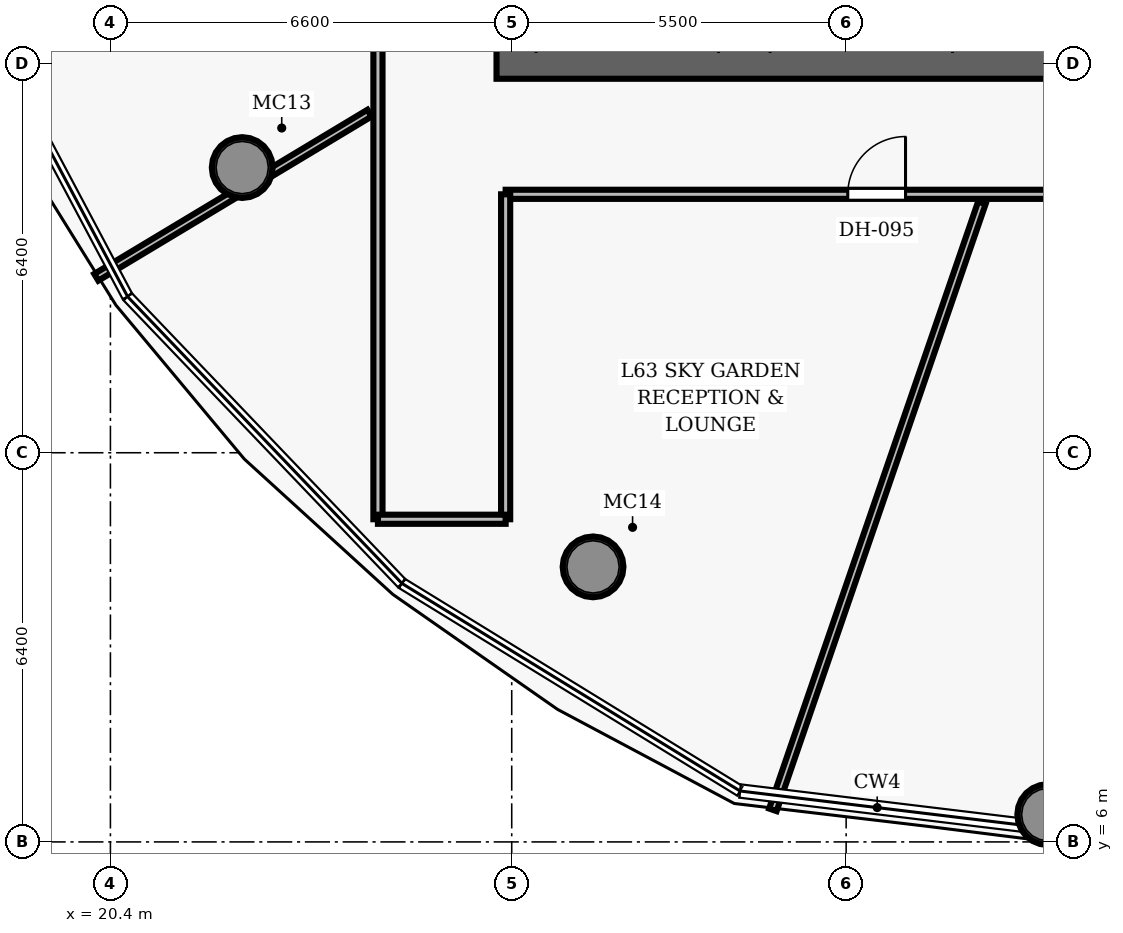
"""IFC4 building model, lengths in metres.
Left out: names, types, materials, properties, quantities, classifications, styles, units other than length and angle.
Written with IfcOpenShell. Run it as: python <this file> out.ifc"""

import sys

from ifc_helpers import new_model, si_unit, direction, frame, frame_2d, origin, origin_2d, place, context, subcontext, project, spatial, rectangle, hollow_circle, extrude, element, fill, save


model = new_model("IFC4")
c1 = context("Model", 3, precision=1e-05, world=origin(), true_north=direction((0.0, 1.0)))
c2 = subcontext(c1, "Body", "Model", "MODEL_VIEW")
j1 = project(units=[si_unit("LENGTHUNIT", "METRE"), si_unit("PLANEANGLEUNIT", "RADIAN")], contexts=[c1])
p1 = place(None, origin())
s1 = spatial("IfcSite", under=j1, at=p1, CompositionType="ELEMENT")
p2 = place(p1, origin())
s2 = spatial("IfcBuilding", under=s1, at=p2, CompositionType="ELEMENT")
p3 = place(p2, frame((0.0, 0.0, 249.75)))
s3 = spatial("IfcBuildingStorey", under=s2, at=p3, CompositionType="ELEMENT", Elevation=249.75)
p4 = place(p3, frame((26.75, 18.8, 0.0), z_axis=(0.0, 0.0, 1.0), x_axis=(1.0, 0.0, 0.0)))
e1 = element("IfcWall", 1, at=p4, inside=s3, PredefinedType="SHEAR", context=c2, shape_type="SweptSolid", body=[
    extrude(rectangle(XDim=22.5, YDim=0.5, at=frame_2d((11.25, 0.0))), origin(), (0.0, 0.0, 1.0), 3.85),
])
p5 = place(p4, frame((14.47, 0.0, 0.0)))
e2 = element("IfcOpeningElement", 2, at=p5, cuts=e1, PredefinedType="OPENING", context=c2, shape_type="SweptSolid", body=[
    extrude(rectangle(XDim=1.05, YDim=2.15, at=frame_2d((0.525, 1.075))), frame((0.0, 0.26, 0.0), z_axis=(0.0, -1.0, 0.0), x_axis=(1.0, 0.0, 0.0)), (0.0, 0.0, 1.0), 0.52),
])
for number, where, z_axis, x_axis in (
    (3, (22.567, 17.09, 0.0), (0.0, 0.0, 1.0), (1.0, 0.0, 0.0)),
    (4, (28.338, 10.523, 0.0), (0.0, 0.0, 1.0), (1.0, 0.0, 0.0)),
    (5, (35.815, 6.449, 0.0), (0.0, 0.0, 1.0), (1.0, 0.0, 0.0)),
):
    element("IfcColumn", number, at=place(p3, frame(where, z_axis=z_axis, x_axis=x_axis)), inside=s3, PredefinedType="COLUMN", context=c2, shape_type="SweptSolid", body=[
        extrude(hollow_circle(Radius=0.5, WallThickness=0.045, at=origin_2d()), origin(), (0.0, 0.0, 1.0), 3.85),
    ])
p6 = place(p3, frame((26.9, 16.65, 0.0), z_axis=(0.0, 0.0, 1.0), x_axis=(1.0, 0.0, 0.0)))
e6 = element("IfcWall", 6, at=p6, inside=s3, PredefinedType="PARTITIONING", context=c2, shape_type="SweptSolid", body=[
    extrude(rectangle(XDim=22.2, YDim=0.15, at=frame_2d((11.1, 0.0))), origin(), (0.0, 0.0, 1.0), 3.04),
])
p7 = place(p6, frame((5.627, 0.0, 0.0)))
e7 = element("IfcOpeningElement", 7, at=p7, cuts=e6, PredefinedType="OPENING", context=c2, shape_type="SweptSolid", body=[
    extrude(rectangle(XDim=0.95, YDim=2.15, at=frame_2d((0.475, 1.075))), frame((0.0, 0.085, 0.0), z_axis=(0.0, -1.0, 0.0), x_axis=(1.0, 0.0, 0.0)), (0.0, 0.0, 1.0), 0.17),
])
p8 = place(p6, frame((12.684, 0.0, 0.0)))
e8 = element("IfcOpeningElement", 8, at=p8, cuts=e6, PredefinedType="OPENING", context=c2, shape_type="SweptSolid", body=[
    extrude(rectangle(XDim=0.95, YDim=2.15, at=frame_2d((0.475, 1.075))), frame((0.0, 0.085, 0.0), z_axis=(0.0, -1.0, 0.0), x_axis=(1.0, 0.0, 0.0)), (0.0, 0.0, 1.0), 0.17),
])
p9 = place(p6, frame((15.904, 0.0, 0.0)))
e9 = element("IfcOpeningElement", 9, at=p9, cuts=e6, PredefinedType="OPENING", context=c2, shape_type="SweptSolid", body=[
    extrude(rectangle(XDim=0.95, YDim=2.15, at=frame_2d((0.475, 1.075))), frame((0.0, 0.085, 0.0), z_axis=(0.0, -1.0, 0.0), x_axis=(1.0, 0.0, 0.0)), (0.0, 0.0, 1.0), 0.17),
])
p10 = place(p3, frame((24.8, 11.306, 0.0), z_axis=(0.0, 0.0, 1.0), x_axis=(0.0, 1.0, 0.0)))
e10 = element("IfcWall", 10, at=p10, inside=s3, PredefinedType="PARTITIONING", context=c2, shape_type="SweptSolid", body=[
    extrude(rectangle(XDim=30.094, YDim=0.15, at=frame_2d((15.047, 0.0))), origin(), (0.0, 0.0, 1.0), 3.04),
])
p11 = place(p10, frame((19.429, 0.0, 0.0)))
e11 = element("IfcOpeningElement", 11, at=p11, cuts=e10, PredefinedType="OPENING", context=c2, shape_type="SweptSolid", body=[
    extrude(rectangle(XDim=0.95, YDim=2.15, at=frame_2d((0.475, 1.075))), frame((0.0, 0.085, 0.0), z_axis=(0.0, -1.0, 0.0), x_axis=(1.0, 0.0, 0.0)), (0.0, 0.0, 1.0), 0.17),
])
p12 = place(p10, frame((10.994, 0.0, 0.0)))
e12 = element("IfcOpeningElement", 12, at=p12, cuts=e10, PredefinedType="OPENING", context=c2, shape_type="SweptSolid", body=[
    extrude(rectangle(XDim=1.5, YDim=2.2, at=frame_2d((0.75, 1.1))), frame((0.0, 0.085, 0.0), z_axis=(0.0, -1.0, 0.0), x_axis=(1.0, 0.0, 0.0)), (0.0, 0.0, 1.0), 0.17),
])
p13 = place(p3, frame((26.9, 11.306, 0.0), z_axis=(0.0, 0.0, 1.0), x_axis=(0.0, 1.0, 0.0)))
e13 = element("IfcWall", 13, at=p13, inside=s3, PredefinedType="PARTITIONING", context=c2, shape_type="SweptSolid", body=[
    extrude(rectangle(XDim=5.344, YDim=0.15, at=frame_2d((2.672, 0.0))), origin(), (0.0, 0.0, 1.0), 3.04),
])
p14 = place(p3, frame((24.8, 11.306, 0.0), z_axis=(0.0, 0.0, 1.0), x_axis=(1.0, 0.0, 0.0)))
e14 = element("IfcWall", 14, at=p14, inside=s3, PredefinedType="PARTITIONING", context=c2, shape_type="SweptSolid", body=[
    extrude(rectangle(XDim=2.1, YDim=0.15, at=frame_2d((1.05, 0.0))), origin(), (0.0, 0.0, 1.0), 3.04),
])
p15 = place(p3, frame((24.66, 17.985, 0.0), z_axis=(0.0, 0.0, 1.0), x_axis=(-0.857155707128, -0.515057369366, 0.0)))
e15 = element("IfcWall", 15, at=p15, inside=s3, PredefinedType="PARTITIONING", context=c2, shape_type="SweptSolid", body=[
    extrude(rectangle(XDim=5.241, YDim=0.13, at=frame_2d((2.621, 0.0))), origin(), (0.0, 0.0, 1.0), 3.04),
])
p16 = place(p3, frame((34.732, 16.51, 0.0), z_axis=(0.0, 0.0, 1.0), x_axis=(-0.325577330782, -0.945515415887, 0.0)))
e16 = element("IfcWall", 16, at=p16, inside=s3, PredefinedType="PARTITIONING", context=c2, shape_type="SweptSolid", body=[
    extrude(rectangle(XDim=10.558, YDim=0.13, at=frame_2d((5.279, 0.0))), origin(), (0.0, 0.0, 1.0), 3.04),
])
p17 = place(p7, origin())
e17 = element("IfcDoor", 17, at=p17, inside=s3, OperationType="SINGLE_SWING_RIGHT", PredefinedType="DOOR", context=c2, shape_type="SweptSolid", body=[
    extrude(rectangle(XDim=0.95, YDim=2.15, at=frame_2d((0.475, 1.075))), frame((0.0, 0.025, 0.0), z_axis=(0.0, -1.0, 0.0), x_axis=(1.0, 0.0, 0.0)), (0.0, 0.0, 1.0), 0.05),
])
fill(e7, e17)
save(model, sys.argv[1])
